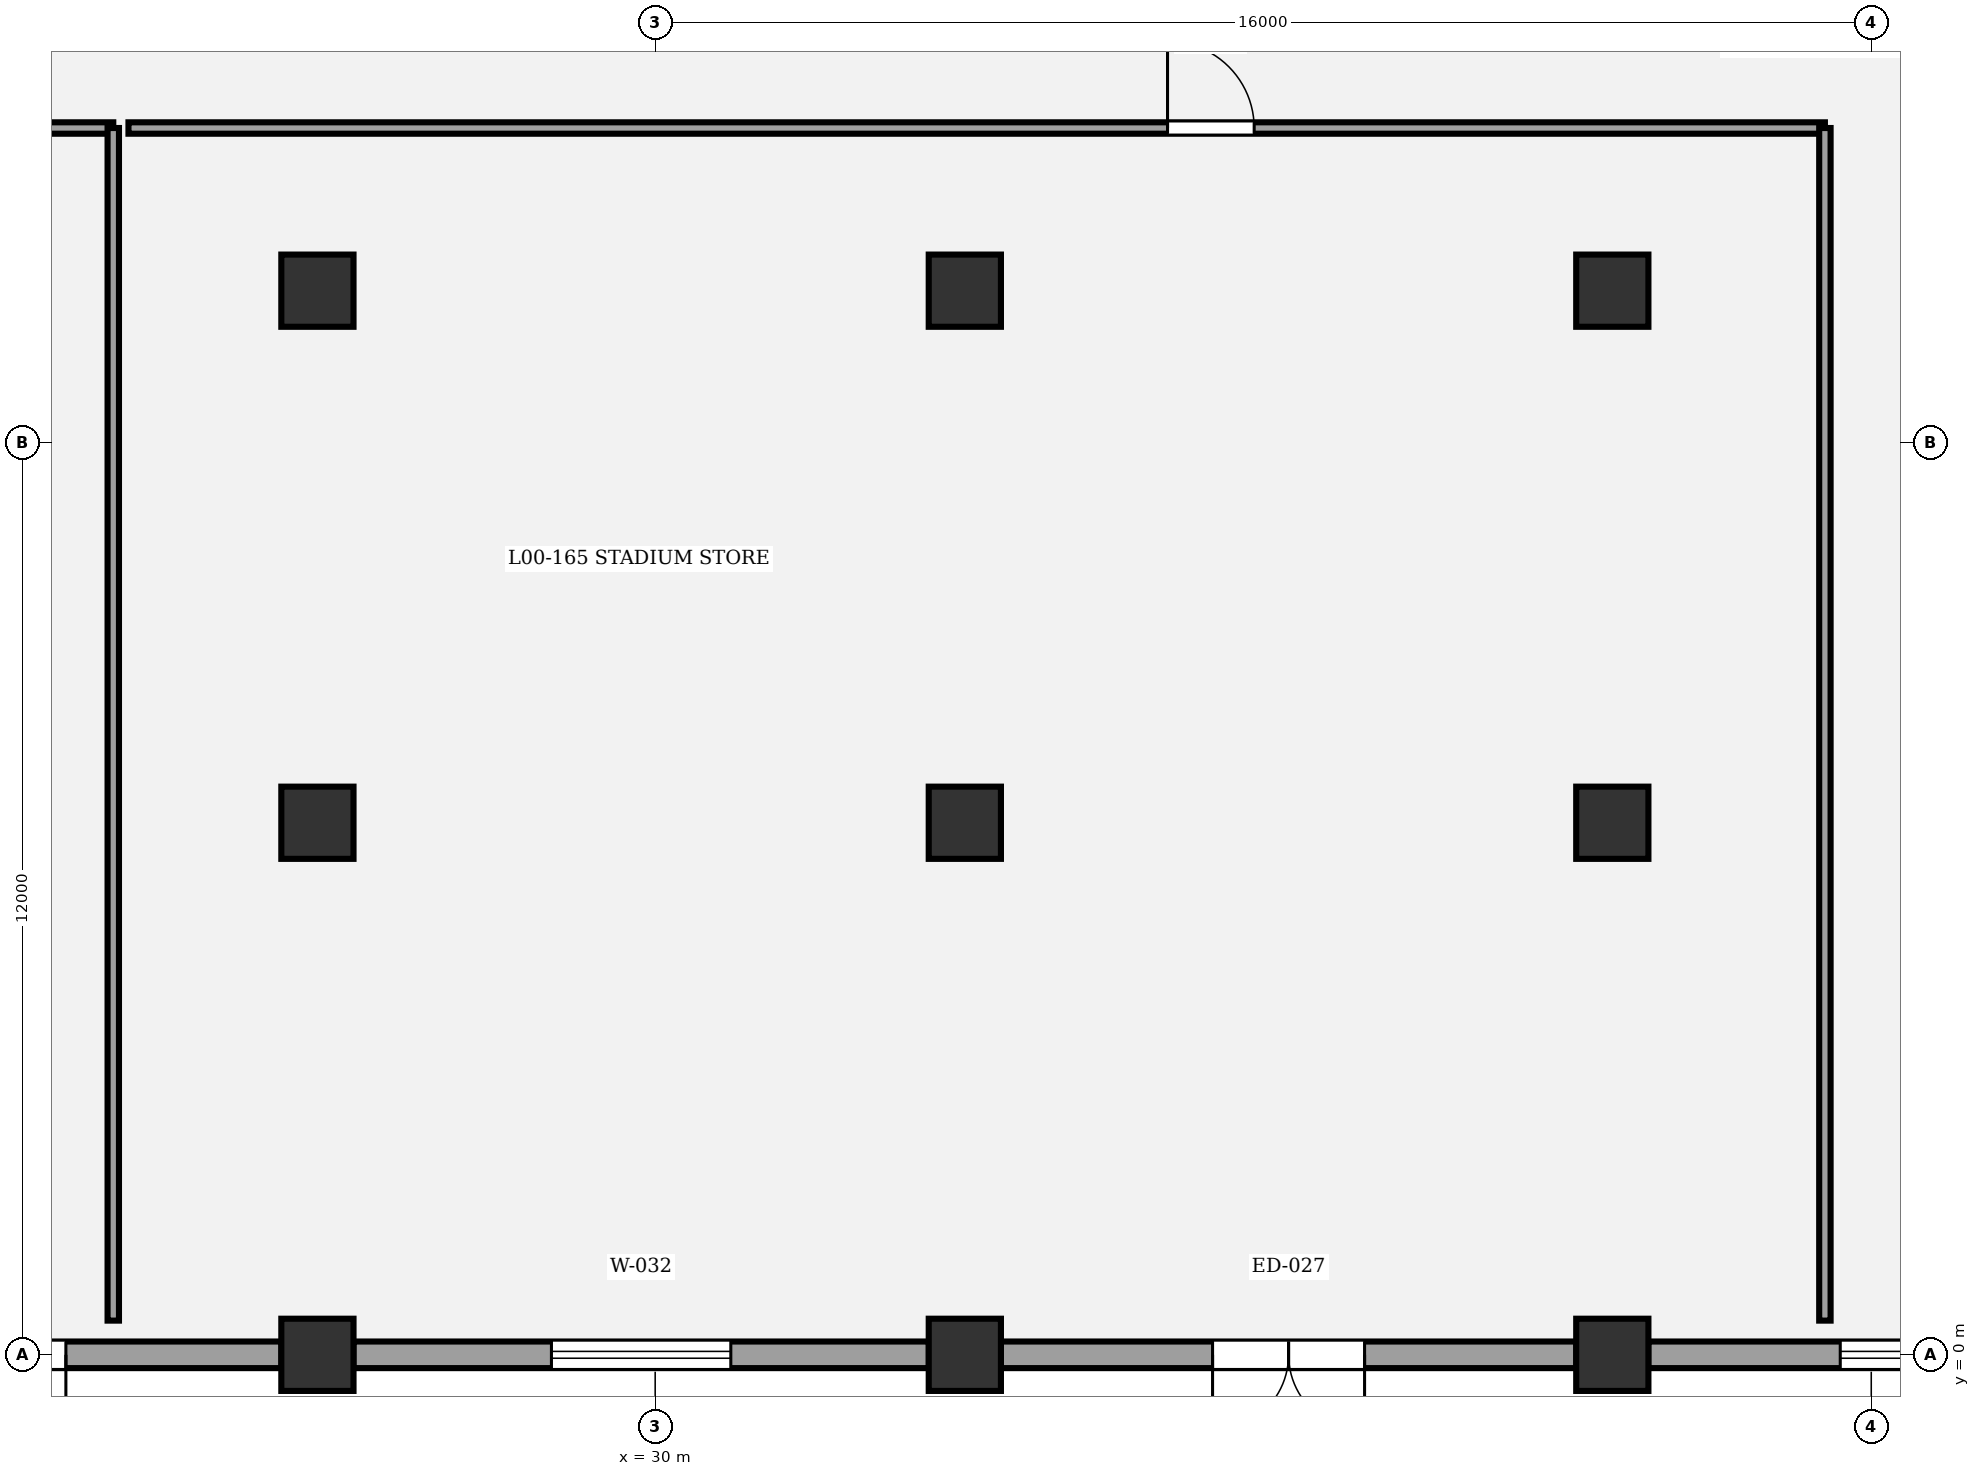
"""IFC4 building model, lengths in metres.
Left out: names, types, materials, properties, quantities, classifications, styles, units other than length and angle.
Written with IfcOpenShell. Run it as: python <this file> out.ifc"""

import sys

from ifc_helpers import new_model, si_unit, direction, frame, frame_2d, origin, origin_2d, place, context, subcontext, project, spatial, rectangle, circle, extrude, element, fill, save


model = new_model("IFC4")
c1 = context("Model", 3, precision=1e-05, world=origin(), true_north=direction((0.0, 1.0)))
c2 = subcontext(c1, "Body", "Model", "MODEL_VIEW")
j1 = project(units=[si_unit("LENGTHUNIT", "METRE"), si_unit("PLANEANGLEUNIT", "RADIAN")], contexts=[c1])
p1 = place(None, origin())
s1 = spatial("IfcSite", under=j1, at=p1, CompositionType="ELEMENT")
p2 = place(p1, origin())
s2 = spatial("IfcBuilding", under=s1, at=p2, CompositionType="ELEMENT")
p3 = place(p2, origin())
s3 = spatial("IfcBuildingStorey", under=s2, at=p3, CompositionType="ELEMENT", Elevation=0.0)
for number, where, z_axis, x_axis in (
    (1, (25.556, 0.0, 0.0), (0.0, 0.0, 1.0), (1.0, 0.0, 0.0)),
    (2, (25.556, 7.0, 0.0), (0.0, 0.0, 1.0), (1.0, 0.0, 0.0)),
    (3, (25.556, 14.0, 0.0), (0.0, 0.0, 1.0), (1.0, 0.0, 0.0)),
    (4, (34.074, 0.0, 0.0), (0.0, 0.0, 1.0), (1.0, 0.0, 0.0)),
    (5, (34.074, 7.0, 0.0), (0.0, 0.0, 1.0), (1.0, 0.0, 0.0)),
    (6, (34.074, 14.0, 0.0), (0.0, 0.0, 1.0), (1.0, 0.0, 0.0)),
    (7, (42.593, 0.0, 0.0), (0.0, 0.0, 1.0), (1.0, 0.0, 0.0)),
    (8, (42.593, 7.0, 0.0), (0.0, 0.0, 1.0), (1.0, 0.0, 0.0)),
    (9, (42.593, 14.0, 0.0), (0.0, 0.0, 1.0), (1.0, 0.0, 0.0)),
):
    element("IfcColumn", number, at=place(p3, frame(where, z_axis=z_axis, x_axis=x_axis)), inside=s3, PredefinedType="COLUMN", context=c2, shape_type="SweptSolid", body=[
        extrude(circle(Radius=0.475, at=origin_2d()), origin(), (0.0, 0.0, 1.0), 5.4),
    ])
p4 = place(p3, frame((25.083, 0.0, 0.0), z_axis=(0.0, 0.0, 1.0), x_axis=(-1.0, 0.0, 0.0)))
e10 = element("IfcWall", 10, at=p4, inside=s3, PredefinedType="STANDARD", context=c2, shape_type="SweptSolid", body=[
    extrude(rectangle(XDim=7.573, YDim=0.35, at=frame_2d((3.787, 0.0))), origin(), (0.0, 0.0, 1.0), 4.16),
])
p5 = place(p4, frame((2.836, 0.0, 0.0)))
e11 = element("IfcOpeningElement", 11, at=p5, cuts=e10, PredefinedType="OPENING", context=c2, shape_type="SweptSolid", body=[
    extrude(rectangle(XDim=1.9, YDim=2.4, at=frame_2d((0.95, 1.2))), frame((0.0, 0.185, 0.0), z_axis=(0.0, -1.0, 0.0), x_axis=(1.0, 0.0, 0.0)), (0.0, 0.0, 1.0), 0.37),
])
p6 = place(p3, frame((33.601, 0.0, 0.0), z_axis=(0.0, 0.0, 1.0), x_axis=(-1.0, 0.0, 0.0)))
e12 = element("IfcWall", 12, at=p6, inside=s3, PredefinedType="STANDARD", context=c2, shape_type="SweptSolid", body=[
    extrude(rectangle(XDim=7.572, YDim=0.35, at=frame_2d((3.786, 0.0))), origin(), (0.0, 0.0, 1.0), 4.16),
])
p7 = place(p6, frame((2.606, 0.0, 0.9)))
e13 = element("IfcOpeningElement", 13, at=p7, cuts=e12, PredefinedType="OPENING", context=c2, shape_type="SweptSolid", body=[
    extrude(rectangle(XDim=2.36, YDim=1.95, at=frame_2d((1.18, 0.975))), frame((0.0, 0.185, 0.0), z_axis=(0.0, -1.0, 0.0), x_axis=(1.0, 0.0, 0.0)), (0.0, 0.0, 1.0), 0.37),
])
p8 = place(p3, frame((42.12, 0.0, 0.0), z_axis=(0.0, 0.0, 1.0), x_axis=(-1.0, 0.0, 0.0)))
e14 = element("IfcWall", 14, at=p8, inside=s3, PredefinedType="STANDARD", context=c2, shape_type="SweptSolid", body=[
    extrude(rectangle(XDim=7.573, YDim=0.35, at=frame_2d((3.787, 0.0))), origin(), (0.0, 0.0, 1.0), 4.16),
])
p9 = place(p8, frame((2.787, 0.0, 0.0)))
e15 = element("IfcOpeningElement", 15, at=p9, cuts=e14, PredefinedType="OPENING", context=c2, shape_type="SweptSolid", body=[
    extrude(rectangle(XDim=2.0, YDim=2.4, at=frame_2d((1.0, 1.2))), frame((0.0, 0.185, 0.0), z_axis=(0.0, -1.0, 0.0), x_axis=(1.0, 0.0, 0.0)), (0.0, 0.0, 1.0), 0.37),
])
p10 = place(p3, frame((50.638, 0.0, 0.0), z_axis=(0.0, 0.0, 1.0), x_axis=(-1.0, 0.0, 0.0)))
e16 = element("IfcWall", 16, at=p10, inside=s3, PredefinedType="STANDARD", context=c2, shape_type="SweptSolid", body=[
    extrude(rectangle(XDim=7.572, YDim=0.35, at=frame_2d((3.786, 0.0))), origin(), (0.0, 0.0, 1.0), 4.16),
])
p11 = place(p10, frame((2.526, 0.0, 0.9)))
e17 = element("IfcOpeningElement", 17, at=p11, cuts=e16, PredefinedType="OPENING", context=c2, shape_type="SweptSolid", body=[
    extrude(rectangle(XDim=2.52, YDim=1.95, at=frame_2d((1.26, 0.975))), frame((0.0, 0.185, 0.0), z_axis=(0.0, -1.0, 0.0), x_axis=(1.0, 0.0, 0.0)), (0.0, 0.0, 1.0), 0.37),
])
p12 = place(p3, frame((13.5, 16.14, 0.0), z_axis=(0.0, 0.0, 1.0), x_axis=(1.0, 0.0, 0.0)))
e18 = element("IfcWall", 18, at=p12, inside=s3, PredefinedType="PARTITIONING", context=c2, shape_type="SweptSolid", body=[
    extrude(rectangle(XDim=9.37, YDim=0.15, at=frame_2d((4.685, 0.0))), origin(), (0.0, 0.0, 1.0), 4.15),
])
p13 = place(p12, frame((7.07, 0.0, 0.0)))
e19 = element("IfcOpeningElement", 19, at=p13, cuts=e18, PredefinedType="OPENING", context=c2, shape_type="SweptSolid", body=[
    extrude(rectangle(XDim=1.06, YDim=2.1, at=frame_2d((0.53, 1.05))), frame((0.0, 0.085, 0.0), z_axis=(0.0, -1.0, 0.0), x_axis=(1.0, 0.0, 0.0)), (0.0, 0.0, 1.0), 0.17),
])
p14 = place(p3, frame((23.07, 16.14, 0.0), z_axis=(0.0, 0.0, 1.0), x_axis=(1.0, 0.0, 0.0)))
e20 = element("IfcWall", 20, at=p14, inside=s3, PredefinedType="PARTITIONING", context=c2, shape_type="SweptSolid", body=[
    extrude(rectangle(XDim=22.32, YDim=0.15, at=frame_2d((11.16, 0.0))), origin(), (0.0, 0.0, 1.0), 4.15),
])
p15 = place(p14, frame((13.671, 0.0, 0.0)))
e21 = element("IfcOpeningElement", 21, at=p15, cuts=e20, PredefinedType="OPENING", context=c2, shape_type="SweptSolid", body=[
    extrude(rectangle(XDim=1.14, YDim=2.1, at=frame_2d((0.57, 1.05))), frame((0.0, 0.085, 0.0), z_axis=(0.0, -1.0, 0.0), x_axis=(1.0, 0.0, 0.0)), (0.0, 0.0, 1.0), 0.17),
])
for number, where, z_axis, x_axis in (
    (22, (22.87, 16.14, 0.0), (0.0, 0.0, 1.0), (0.0, -1.0, 0.0)),
    (23, (45.39, 16.14, 0.0), (0.0, 0.0, 1.0), (0.0, -1.0, 0.0)),
):
    element("IfcWall", number, at=place(p3, frame(where, z_axis=z_axis, x_axis=x_axis)), inside=s3, PredefinedType="PARTITIONING", context=c2, shape_type="SweptSolid", body=[
        extrude(rectangle(XDim=15.69, YDim=0.15, at=frame_2d((7.845, 0.0))), origin(), (0.0, 0.0, 1.0), 4.15),
    ])
p16 = place(p5, origin())
e24 = element("IfcDoor", 24, at=p16, inside=s3, OperationType="DOUBLE_DOOR_SINGLE_SWING", PredefinedType="DOOR", context=c2, shape_type="SweptSolid", body=[
    extrude(rectangle(XDim=1.9, YDim=2.4, at=frame_2d((0.95, 1.2))), frame((0.0, 0.025, 0.0), z_axis=(0.0, -1.0, 0.0), x_axis=(1.0, 0.0, 0.0)), (0.0, 0.0, 1.0), 0.05),
])
fill(e11, e24)
p17 = place(p7, origin())
e25 = element("IfcWindow", 25, at=p17, inside=s3, PartitioningType="SINGLE_PANEL", PredefinedType="WINDOW", context=c2, shape_type="SweptSolid", body=[
    extrude(rectangle(XDim=2.36, YDim=1.95, at=frame_2d((1.18, 0.975))), frame((0.0, 0.03, 0.0), z_axis=(0.0, -1.0, 0.0), x_axis=(1.0, 0.0, 0.0)), (0.0, 0.0, 1.0), 0.06),
])
fill(e13, e25)
p18 = place(p9, origin())
e26 = element("IfcDoor", 26, at=p18, inside=s3, OperationType="DOUBLE_DOOR_SINGLE_SWING", PredefinedType="DOOR", context=c2, shape_type="SweptSolid", body=[
    extrude(rectangle(XDim=2.0, YDim=2.4, at=frame_2d((1.0, 1.2))), frame((0.0, 0.025, 0.0), z_axis=(0.0, -1.0, 0.0), x_axis=(1.0, 0.0, 0.0)), (0.0, 0.0, 1.0), 0.05),
])
fill(e15, e26)
p19 = place(p11, origin())
e27 = element("IfcWindow", 27, at=p19, inside=s3, PartitioningType="SINGLE_PANEL", PredefinedType="WINDOW", context=c2, shape_type="SweptSolid", body=[
    extrude(rectangle(XDim=2.52, YDim=1.95, at=frame_2d((1.26, 0.975))), frame((0.0, 0.03, 0.0), z_axis=(0.0, -1.0, 0.0), x_axis=(1.0, 0.0, 0.0)), (0.0, 0.0, 1.0), 0.06),
])
fill(e17, e27)
p20 = place(p15, origin())
e28 = element("IfcDoor", 28, at=p20, inside=s3, OperationType="SINGLE_SWING_LEFT", PredefinedType="DOOR", context=c2, shape_type="SweptSolid", body=[
    extrude(rectangle(XDim=1.14, YDim=2.1, at=frame_2d((0.57, 1.05))), frame((0.0, 0.025, 0.0), z_axis=(0.0, -1.0, 0.0), x_axis=(1.0, 0.0, 0.0)), (0.0, 0.0, 1.0), 0.05),
])
fill(e21, e28)
save(model, sys.argv[1])
